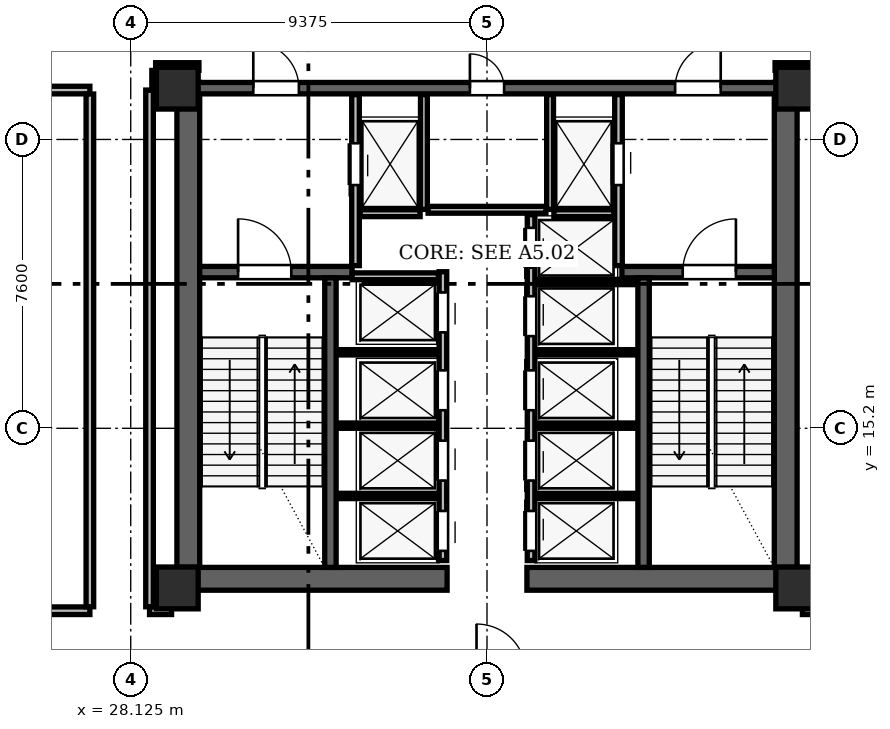
"""IFC4 building model, lengths in metres.
Left out: names, types, materials, properties, quantities, classifications, styles, units other than length and angle.
Written with IfcOpenShell. Run it as: python <this file> out.ifc"""

import sys

from ifc_helpers import new_model, si_unit, direction, frame, frame_2d, origin, origin_2d, place, context, subcontext, project, spatial, rectangle, hollow_rectangle, extrude, element, fill, save


model = new_model("IFC4")
c1 = context("Model", 3, precision=1e-05, world=origin(), true_north=direction((0.0, 1.0)))
c2 = subcontext(c1, "Body", "Model", "MODEL_VIEW")
j1 = project(units=[si_unit("LENGTHUNIT", "METRE"), si_unit("PLANEANGLEUNIT", "RADIAN")], contexts=[c1])
p1 = place(None, origin())
s1 = spatial("IfcSite", under=j1, at=p1, CompositionType="ELEMENT")
p2 = place(p1, origin())
s2 = spatial("IfcBuilding", under=s1, at=p2, CompositionType="ELEMENT")
p3 = place(p2, origin())
s3 = spatial("IfcBuildingStorey", under=s2, at=p3, CompositionType="ELEMENT", Elevation=0.0)
for number, where, z_axis, x_axis in (
    (1, (29.35, 11.0, 0.0), (0.0, 0.0, 1.0), (1.0, 0.0, 0.0)),
    (2, (45.65, 11.0, 0.0), (0.0, 0.0, 1.0), (1.0, 0.0, 0.0)),
    (3, (45.65, 24.15, 0.0), (0.0, 0.0, 1.0), (1.0, 0.0, 0.0)),
    (4, (29.35, 24.15, 0.0), (0.0, 0.0, 1.0), (1.0, 0.0, 0.0)),
):
    element("IfcColumn", number, at=place(p3, frame(where, z_axis=z_axis, x_axis=x_axis)), inside=s3, PredefinedType="COLUMN", context=c2, shape_type="SweptSolid", body=[
        extrude(hollow_rectangle(XDim=1.1, YDim=1.1, WallThickness=0.09, at=origin_2d()), origin(), (0.0, 0.0, 1.0), 5.4),
    ])
for number, where, z_axis, x_axis in (
    (5, (29.64, 11.0, 0.0), (0.0, 0.0, 1.0), (0.0, 1.0, 0.0)),
    (6, (45.36, 11.0, 0.0), (0.0, 0.0, 1.0), (0.0, 1.0, 0.0)),
):
    element("IfcWall", number, at=place(p3, frame(where, z_axis=z_axis, x_axis=x_axis)), inside=s3, PredefinedType="SHEAR", context=c2, shape_type="SweptSolid", body=[
        extrude(rectangle(XDim=13.3, YDim=0.6, at=frame_2d((6.65, 0.0))), origin(), (0.0, 0.0, 1.0), 5.12),
    ])
for number, where, z_axis, x_axis in (
    (7, (29.35, 11.24, 0.0), (0.0, 0.0, 1.0), (1.0, 0.0, 0.0)),
    (8, (38.55, 11.24, 0.0), (0.0, 0.0, 1.0), (1.0, 0.0, 0.0)),
):
    element("IfcWall", number, at=place(p3, frame(where, z_axis=z_axis, x_axis=x_axis)), inside=s3, PredefinedType="SHEAR", context=c2, shape_type="SweptSolid", body=[
        extrude(rectangle(XDim=7.1, YDim=0.6, at=frame_2d((3.55, 0.0))), origin(), (0.0, 0.0, 1.0), 5.12),
    ])
p4 = place(p3, frame((29.65, 24.15, 0.0), z_axis=(0.0, 0.0, 1.0), x_axis=(1.0, 0.0, 0.0)))
e9 = element("IfcWall", 9, at=p4, inside=s3, PredefinedType="SHEAR", context=c2, shape_type="SweptSolid", body=[
    extrude(rectangle(XDim=15.7, YDim=0.3, at=frame_2d((7.85, 0.0))), origin(), (0.0, 0.0, 1.0), 5.12),
])
p5 = place(p4, frame((1.7, 0.0, 0.0)))
e10 = element("IfcOpeningElement", 10, at=p5, cuts=e9, PredefinedType="OPENING", context=c2, shape_type="SweptSolid", body=[
    extrude(rectangle(XDim=1.2, YDim=2.2, at=frame_2d((0.6, 1.1))), frame((0.0, 0.15, 0.0), z_axis=(0.0, -1.0, 0.0), x_axis=(1.0, 0.0, 0.0)), (0.0, 0.0, 1.0), 0.3),
])
p6 = place(p4, frame((12.8, 0.0, 0.0)))
e11 = element("IfcOpeningElement", 11, at=p6, cuts=e9, PredefinedType="OPENING", context=c2, shape_type="SweptSolid", body=[
    extrude(rectangle(XDim=1.2, YDim=2.2, at=frame_2d((0.6, 1.1))), frame((0.0, 0.15, 0.0), z_axis=(0.0, -1.0, 0.0), x_axis=(1.0, 0.0, 0.0)), (0.0, 0.0, 1.0), 0.3),
])
p7 = place(p4, frame((7.4, 0.0, 0.0)))
e12 = element("IfcOpeningElement", 12, at=p7, cuts=e9, PredefinedType="OPENING", context=c2, shape_type="SweptSolid", body=[
    extrude(rectangle(XDim=0.9, YDim=2.05, at=frame_2d((0.45, 1.025))), frame((0.0, 0.15, 0.0), z_axis=(0.0, -1.0, 0.0), x_axis=(1.0, 0.0, 0.0)), (0.0, 0.0, 1.0), 0.3),
])
p8 = place(p3, frame((29.94, 19.31, 0.0), z_axis=(0.0, 0.0, 1.0), x_axis=(1.0, 0.0, 0.0)))
e13 = element("IfcWall", 13, at=p8, inside=s3, PredefinedType="SHEAR", context=c2, shape_type="SweptSolid", body=[
    extrude(rectangle(XDim=4.01, YDim=0.3, at=frame_2d((2.005, 0.0))), origin(), (0.0, 0.0, 1.0), 5.12),
])
p9 = place(p8, frame((1.01, 0.0, 0.0)))
e14 = element("IfcOpeningElement", 14, at=p9, cuts=e13, PredefinedType="OPENING", context=c2, shape_type="SweptSolid", body=[
    extrude(rectangle(XDim=1.4, YDim=2.2, at=frame_2d((0.7, 1.1))), frame((0.0, 0.15, 0.0), z_axis=(0.0, -1.0, 0.0), x_axis=(1.0, 0.0, 0.0)), (0.0, 0.0, 1.0), 0.3),
])
p10 = place(p3, frame((41.05, 19.31, 0.0), z_axis=(0.0, 0.0, 1.0), x_axis=(1.0, 0.0, 0.0)))
e15 = element("IfcWall", 15, at=p10, inside=s3, PredefinedType="SHEAR", context=c2, shape_type="SweptSolid", body=[
    extrude(rectangle(XDim=4.01, YDim=0.3, at=frame_2d((2.005, 0.0))), origin(), (0.0, 0.0, 1.0), 5.12),
])
p11 = place(p10, frame((1.6, 0.0, 0.0)))
e16 = element("IfcOpeningElement", 16, at=p11, cuts=e15, PredefinedType="OPENING", context=c2, shape_type="SweptSolid", body=[
    extrude(rectangle(XDim=1.4, YDim=2.2, at=frame_2d((0.7, 1.1))), frame((0.0, 0.15, 0.0), z_axis=(0.0, -1.0, 0.0), x_axis=(1.0, 0.0, 0.0)), (0.0, 0.0, 1.0), 0.3),
])
for number, where, z_axis, x_axis in (
    (17, (33.38, 11.54, 0.0), (0.0, 0.0, 1.0), (0.0, 1.0, 0.0)),
    (18, (41.62, 11.54, 0.0), (0.0, 0.0, 1.0), (0.0, 1.0, 0.0)),
):
    element("IfcWall", number, at=place(p3, frame(where, z_axis=z_axis, x_axis=x_axis)), inside=s3, PredefinedType="SHEAR", context=c2, shape_type="SweptSolid", body=[
        extrude(rectangle(XDim=7.62, YDim=0.3, at=frame_2d((3.81, 0.0))), origin(), (0.0, 0.0, 1.0), 5.12),
    ])
p12 = place(p3, frame((34.04, 19.48, 0.0), z_axis=(0.0, 0.0, 1.0), x_axis=(0.0, 1.0, 0.0)))
e19 = element("IfcWall", 19, at=p12, inside=s3, PredefinedType="PARTITIONING", context=c2, shape_type="SweptSolid", body=[
    extrude(rectangle(XDim=4.5, YDim=0.2, at=frame_2d((2.25, 0.0))), origin(), (0.0, 0.0, 1.0), 4.16),
])
p13 = place(p12, frame((2.12, 0.0, 0.0)))
e20 = element("IfcOpeningElement", 20, at=p13, cuts=e19, PredefinedType="OPENING", context=c2, shape_type="SweptSolid", body=[
    extrude(rectangle(XDim=1.1, YDim=2.2, at=frame_2d((0.55, 1.1))), frame((0.0, 0.1, 0.0), z_axis=(0.0, -1.0, 0.0), x_axis=(1.0, 0.0, 0.0)), (0.0, 0.0, 1.0), 0.2),
])
p14 = place(p3, frame((35.84, 20.96, 0.0), z_axis=(0.0, 0.0, 1.0), x_axis=(0.0, 1.0, 0.0)))
e21 = element("IfcWall", 21, at=p14, inside=s3, PredefinedType="PARTITIONING", context=c2, shape_type="SweptSolid", body=[
    extrude(rectangle(XDim=3.02, YDim=0.18, at=frame_2d((1.51, 0.0))), origin(), (0.0, 0.0, 1.0), 4.16),
])
p15 = place(p3, frame((34.16, 20.86, 0.0), z_axis=(0.0, 0.0, 1.0), x_axis=(1.0, 0.0, 0.0)))
e22 = element("IfcWall", 22, at=p15, inside=s3, PredefinedType="PARTITIONING", context=c2, shape_type="SweptSolid", body=[
    extrude(rectangle(XDim=1.58, YDim=0.18, at=frame_2d((0.79, 0.0))), origin(), (0.0, 0.0, 1.0), 5.12),
])
p16 = place(p3, frame((40.96, 19.48, 0.0), z_axis=(0.0, 0.0, 1.0), x_axis=(0.0, 1.0, 0.0)))
e23 = element("IfcWall", 23, at=p16, inside=s3, PredefinedType="PARTITIONING", context=c2, shape_type="SweptSolid", body=[
    extrude(rectangle(XDim=4.5, YDim=0.2, at=frame_2d((2.25, 0.0))), origin(), (0.0, 0.0, 1.0), 4.16),
])
p17 = place(p16, frame((2.12, 0.0, 0.0)))
e24 = element("IfcOpeningElement", 24, at=p17, cuts=e23, PredefinedType="OPENING", context=c2, shape_type="SweptSolid", body=[
    extrude(rectangle(XDim=1.1, YDim=2.2, at=frame_2d((0.55, 1.1))), frame((0.0, 0.1, 0.0), z_axis=(0.0, -1.0, 0.0), x_axis=(1.0, 0.0, 0.0)), (0.0, 0.0, 1.0), 0.2),
])
p18 = place(p3, frame((39.16, 20.96, 0.0), z_axis=(0.0, 0.0, 1.0), x_axis=(0.0, 1.0, 0.0)))
e25 = element("IfcWall", 25, at=p18, inside=s3, PredefinedType="PARTITIONING", context=c2, shape_type="SweptSolid", body=[
    extrude(rectangle(XDim=3.02, YDim=0.18, at=frame_2d((1.51, 0.0))), origin(), (0.0, 0.0, 1.0), 4.16),
])
p19 = place(p3, frame((39.26, 20.86, 0.0), z_axis=(0.0, 0.0, 1.0), x_axis=(1.0, 0.0, 0.0)))
e26 = element("IfcWall", 26, at=p19, inside=s3, PredefinedType="PARTITIONING", context=c2, shape_type="SweptSolid", body=[
    extrude(rectangle(XDim=1.58, YDim=0.18, at=frame_2d((0.79, 0.0))), origin(), (0.0, 0.0, 1.0), 5.12),
])
p20 = place(p3, frame((36.34, 11.72, 0.0), z_axis=(0.0, 0.0, 1.0), x_axis=(0.0, 1.0, 0.0)))
e27 = element("IfcWall", 27, at=p20, inside=s3, PredefinedType="PARTITIONING", context=c2, shape_type="SweptSolid", body=[
    extrude(rectangle(XDim=7.6, YDim=0.2, at=frame_2d((3.8, 0.0))), origin(), (0.0, 0.0, 1.0), 5.12),
])
p21 = place(p20, frame((0.255, 0.0, 0.0)))
e28 = element("IfcOpeningElement", 28, at=p21, cuts=e27, PredefinedType="OPENING", context=c2, shape_type="SweptSolid", body=[
    extrude(rectangle(XDim=1.05, YDim=2.15, at=frame_2d((0.525, 1.075))), frame((0.0, 0.1, 0.0), z_axis=(0.0, -1.0, 0.0), x_axis=(1.0, 0.0, 0.0)), (0.0, 0.0, 1.0), 0.2),
])
p22 = place(p20, frame((2.105, 0.0, 0.0)))
e29 = element("IfcOpeningElement", 29, at=p22, cuts=e27, PredefinedType="OPENING", context=c2, shape_type="SweptSolid", body=[
    extrude(rectangle(XDim=1.05, YDim=2.15, at=frame_2d((0.525, 1.075))), frame((0.0, 0.1, 0.0), z_axis=(0.0, -1.0, 0.0), x_axis=(1.0, 0.0, 0.0)), (0.0, 0.0, 1.0), 0.2),
])
p23 = place(p20, frame((3.955, 0.0, 0.0)))
e30 = element("IfcOpeningElement", 30, at=p23, cuts=e27, PredefinedType="OPENING", context=c2, shape_type="SweptSolid", body=[
    extrude(rectangle(XDim=1.05, YDim=2.15, at=frame_2d((0.525, 1.075))), frame((0.0, 0.1, 0.0), z_axis=(0.0, -1.0, 0.0), x_axis=(1.0, 0.0, 0.0)), (0.0, 0.0, 1.0), 0.2),
])
p24 = place(p20, frame((6.005, 0.0, 0.0)))
e31 = element("IfcOpeningElement", 31, at=p24, cuts=e27, PredefinedType="OPENING", context=c2, shape_type="SweptSolid", body=[
    extrude(rectangle(XDim=1.05, YDim=2.15, at=frame_2d((0.525, 1.075))), frame((0.0, 0.1, 0.0), z_axis=(0.0, -1.0, 0.0), x_axis=(1.0, 0.0, 0.0)), (0.0, 0.0, 1.0), 0.2),
])
p25 = place(p3, frame((33.95, 19.2, 0.0), z_axis=(0.0, 0.0, 1.0), x_axis=(1.0, 0.0, 0.0)))
e32 = element("IfcWall", 32, at=p25, inside=s3, PredefinedType="PARTITIONING", context=c2, shape_type="SweptSolid", body=[
    extrude(rectangle(XDim=2.27, YDim=0.18, at=frame_2d((1.135, 0.0))), origin(), (0.0, 0.0, 1.0), 5.12),
])
for number, where, z_axis, x_axis in (
    (33, (33.56, 13.42, 0.0), (0.0, 0.0, 1.0), (1.0, 0.0, 0.0)),
    (34, (33.56, 15.27, 0.0), (0.0, 0.0, 1.0), (1.0, 0.0, 0.0)),
    (35, (33.56, 17.2, 0.0), (0.0, 0.0, 1.0), (1.0, 0.0, 0.0)),
):
    element("IfcWall", number, at=place(p3, frame(where, z_axis=z_axis, x_axis=x_axis)), inside=s3, PredefinedType="PARTITIONING", context=c2, shape_type="SweptSolid", body=[
        extrude(rectangle(XDim=2.66, YDim=0.14, at=frame_2d((1.33, 0.0))), origin(), (0.0, 0.0, 1.0), 5.12),
    ])
p26 = place(p3, frame((38.66, 11.72, 0.0), z_axis=(0.0, 0.0, 1.0), x_axis=(0.0, 1.0, 0.0)))
e36 = element("IfcWall", 36, at=p26, inside=s3, PredefinedType="PARTITIONING", context=c2, shape_type="SweptSolid", body=[
    extrude(rectangle(XDim=9.1, YDim=0.2, at=frame_2d((4.55, 0.0))), origin(), (0.0, 0.0, 1.0), 5.12),
])
p27 = place(p26, frame((0.255, 0.0, 0.0)))
e37 = element("IfcOpeningElement", 37, at=p27, cuts=e36, PredefinedType="OPENING", context=c2, shape_type="SweptSolid", body=[
    extrude(rectangle(XDim=1.05, YDim=2.15, at=frame_2d((0.525, 1.075))), frame((0.0, 0.1, 0.0), z_axis=(0.0, -1.0, 0.0), x_axis=(1.0, 0.0, 0.0)), (0.0, 0.0, 1.0), 0.2),
])
p28 = place(p26, frame((2.105, 0.0, 0.0)))
e38 = element("IfcOpeningElement", 38, at=p28, cuts=e36, PredefinedType="OPENING", context=c2, shape_type="SweptSolid", body=[
    extrude(rectangle(XDim=1.05, YDim=2.15, at=frame_2d((0.525, 1.075))), frame((0.0, 0.1, 0.0), z_axis=(0.0, -1.0, 0.0), x_axis=(1.0, 0.0, 0.0)), (0.0, 0.0, 1.0), 0.2),
])
p29 = place(p26, frame((3.955, 0.0, 0.0)))
e39 = element("IfcOpeningElement", 39, at=p29, cuts=e36, PredefinedType="OPENING", context=c2, shape_type="SweptSolid", body=[
    extrude(rectangle(XDim=1.05, YDim=2.15, at=frame_2d((0.525, 1.075))), frame((0.0, 0.1, 0.0), z_axis=(0.0, -1.0, 0.0), x_axis=(1.0, 0.0, 0.0)), (0.0, 0.0, 1.0), 0.2),
])
p30 = place(p26, frame((5.905, 0.0, 0.0)))
e40 = element("IfcOpeningElement", 40, at=p30, cuts=e36, PredefinedType="OPENING", context=c2, shape_type="SweptSolid", body=[
    extrude(rectangle(XDim=1.05, YDim=2.15, at=frame_2d((0.525, 1.075))), frame((0.0, 0.1, 0.0), z_axis=(0.0, -1.0, 0.0), x_axis=(1.0, 0.0, 0.0)), (0.0, 0.0, 1.0), 0.2),
])
p31 = place(p26, frame((7.705, 0.0, 0.0)))
e41 = element("IfcOpeningElement", 41, at=p31, cuts=e36, PredefinedType="OPENING", context=c2, shape_type="SweptSolid", body=[
    extrude(rectangle(XDim=1.05, YDim=2.15, at=frame_2d((0.525, 1.075))), frame((0.0, 0.1, 0.0), z_axis=(0.0, -1.0, 0.0), x_axis=(1.0, 0.0, 0.0)), (0.0, 0.0, 1.0), 0.2),
])
for number, where, z_axis, x_axis in (
    (42, (38.78, 13.42, 0.0), (0.0, 0.0, 1.0), (1.0, 0.0, 0.0)),
    (43, (38.78, 15.27, 0.0), (0.0, 0.0, 1.0), (1.0, 0.0, 0.0)),
    (44, (38.78, 17.2, 0.0), (0.0, 0.0, 1.0), (1.0, 0.0, 0.0)),
    (45, (38.78, 19.05, 0.0), (0.0, 0.0, 1.0), (1.0, 0.0, 0.0)),
):
    element("IfcWall", number, at=place(p3, frame(where, z_axis=z_axis, x_axis=x_axis)), inside=s3, PredefinedType="PARTITIONING", context=c2, shape_type="SweptSolid", body=[
        extrude(rectangle(XDim=2.66, YDim=0.14, at=frame_2d((1.33, 0.0))), origin(), (0.0, 0.0, 1.0), 5.12),
    ])
p32 = place(p3, frame((35.95, 20.95, 0.0), z_axis=(0.0, 0.0, 1.0), x_axis=(1.0, 0.0, 0.0)))
e46 = element("IfcWall", 46, at=p32, inside=s3, PredefinedType="PARTITIONING", context=c2, shape_type="SweptSolid", body=[
    extrude(rectangle(XDim=3.1, YDim=0.18, at=frame_2d((1.55, 0.0))), origin(), (0.0, 0.0, 1.0), 5.12),
])
p33 = place(p3, frame((16.25, 10.4, 0.0), z_axis=(0.0, 0.0, 1.0), x_axis=(1.0, 0.0, 0.0)))
e47 = element("IfcWall", 47, at=p33, inside=s3, PredefinedType="PARTITIONING", context=c2, shape_type="SweptSolid", body=[
    extrude(rectangle(XDim=10.8, YDim=0.2, at=frame_2d((5.4, 0.0))), origin(), (0.0, 0.0, 1.0), 5.12),
])
for number, where, z_axis, x_axis in (
    (48, (28.62, 10.4, 0.0), (0.0, 0.0, 1.0), (1.0, 0.0, 0.0)),
    (49, (45.8, 10.4, 0.0), (0.0, 0.0, 1.0), (1.0, 0.0, 0.0)),
):
    element("IfcWall", number, at=place(p3, frame(where, z_axis=z_axis, x_axis=x_axis)), inside=s3, PredefinedType="PARTITIONING", context=c2, shape_type="SweptSolid", body=[
        extrude(rectangle(XDim=0.58, YDim=0.2, at=frame_2d((0.29, 0.0))), origin(), (0.0, 0.0, 1.0), 4.183),
    ])
p34 = place(p3, frame((22.6, 24.1, 0.0), z_axis=(0.0, 0.0, 1.0), x_axis=(1.0, 0.0, 0.0)))
e50 = element("IfcWall", 50, at=p34, inside=s3, PredefinedType="PARTITIONING", context=c2, shape_type="SweptSolid", body=[
    extrude(rectangle(XDim=4.45, YDim=0.2, at=frame_2d((2.225, 0.0))), origin(), (0.0, 0.0, 1.0), 5.12),
])
for number, where, z_axis, x_axis in (
    (51, (28.78, 24.72, 0.0), (0.0, 0.0, 1.0), (1.0, 0.0, 0.0)),
    (52, (45.08, 24.72, 0.0), (0.0, 0.0, 1.0), (1.0, 0.0, 0.0)),
):
    element("IfcWall", number, at=place(p3, frame(where, z_axis=z_axis, x_axis=x_axis)), inside=s3, PredefinedType="PARTITIONING", context=c2, shape_type="SweptSolid", body=[
        extrude(rectangle(XDim=1.14, YDim=0.2, at=frame_2d((0.57, 0.0))), origin(), (0.0, 0.0, 1.0), 4.183),
    ])
p35 = place(p3, frame((27.05, 10.504, 0.0), z_axis=(0.0, 0.0, 1.0), x_axis=(0.0, 1.0, 0.0)))
e53 = element("IfcWall", 53, at=p35, inside=s3, PredefinedType="PARTITIONING", context=c2, shape_type="SweptSolid", body=[
    extrude(rectangle(XDim=13.492, YDim=0.2, at=frame_2d((6.746, 0.0))), origin(), (0.0, 0.0, 1.0), 4.183),
])
p36 = place(p3, frame((28.62, 10.504, 0.0), z_axis=(0.0, 0.0, 1.0), x_axis=(0.0, 1.0, 0.0)))
e54 = element("IfcWall", 54, at=p36, inside=s3, PredefinedType="PARTITIONING", context=c2, shape_type="SweptSolid", body=[
    extrude(rectangle(XDim=13.596, YDim=0.2, at=frame_2d((6.798, 0.0))), origin(), (0.0, 0.0, 1.0), 4.183),
])
p37 = place(p3, frame((28.78, 24.1, 0.0), z_axis=(0.0, 0.0, 1.0), x_axis=(0.0, 1.0, 0.0)))
e55 = element("IfcWall", 55, at=p37, inside=s3, PredefinedType="PARTITIONING", context=c2, shape_type="SweptSolid", body=[
    extrude(rectangle(XDim=0.516, YDim=0.2, at=frame_2d((0.258, 0.0))), origin(), (0.0, 0.0, 1.0), 5.12),
])
p38 = place(p13, origin())
e56 = element("IfcDoor", 56, at=p38, inside=s3, OperationType="SLIDING_TO_LEFT", PredefinedType="DOOR", context=c2, shape_type="SweptSolid", body=[
    extrude(rectangle(XDim=1.1, YDim=2.2, at=frame_2d((0.55, 1.1))), frame((0.0, 0.025, 0.0), z_axis=(0.0, -1.0, 0.0), x_axis=(1.0, 0.0, 0.0)), (0.0, 0.0, 1.0), 0.05),
])
fill(e20, e56)
p39 = place(p17, origin())
e57 = element("IfcDoor", 57, at=p39, inside=s3, OperationType="SLIDING_TO_RIGHT", PredefinedType="DOOR", context=c2, shape_type="SweptSolid", body=[
    extrude(rectangle(XDim=1.1, YDim=2.2, at=frame_2d((0.55, 1.1))), frame((0.0, 0.025, 0.0), z_axis=(0.0, -1.0, 0.0), x_axis=(1.0, 0.0, 0.0)), (0.0, 0.0, 1.0), 0.05),
])
fill(e24, e57)
p40 = place(p21, origin())
e58 = element("IfcDoor", 58, at=p40, inside=s3, OperationType="SLIDING_TO_LEFT", PredefinedType="DOOR", context=c2, shape_type="SweptSolid", body=[
    extrude(rectangle(XDim=1.05, YDim=2.15, at=frame_2d((0.525, 1.075))), frame((0.0, 0.025, 0.0), z_axis=(0.0, -1.0, 0.0), x_axis=(1.0, 0.0, 0.0)), (0.0, 0.0, 1.0), 0.05),
])
fill(e28, e58)
p41 = place(p22, origin())
e59 = element("IfcDoor", 59, at=p41, inside=s3, OperationType="SLIDING_TO_RIGHT", PredefinedType="DOOR", context=c2, shape_type="SweptSolid", body=[
    extrude(rectangle(XDim=1.05, YDim=2.15, at=frame_2d((0.525, 1.075))), frame((0.0, 0.025, 0.0), z_axis=(0.0, -1.0, 0.0), x_axis=(1.0, 0.0, 0.0)), (0.0, 0.0, 1.0), 0.05),
])
fill(e29, e59)
p42 = place(p23, origin())
e60 = element("IfcDoor", 60, at=p42, inside=s3, OperationType="SLIDING_TO_LEFT", PredefinedType="DOOR", context=c2, shape_type="SweptSolid", body=[
    extrude(rectangle(XDim=1.05, YDim=2.15, at=frame_2d((0.525, 1.075))), frame((0.0, 0.025, 0.0), z_axis=(0.0, -1.0, 0.0), x_axis=(1.0, 0.0, 0.0)), (0.0, 0.0, 1.0), 0.05),
])
fill(e30, e60)
p43 = place(p27, origin())
e61 = element("IfcDoor", 61, at=p43, inside=s3, OperationType="SLIDING_TO_RIGHT", PredefinedType="DOOR", context=c2, shape_type="SweptSolid", body=[
    extrude(rectangle(XDim=1.05, YDim=2.15, at=frame_2d((0.525, 1.075))), frame((0.0, 0.025, 0.0), z_axis=(0.0, -1.0, 0.0), x_axis=(1.0, 0.0, 0.0)), (0.0, 0.0, 1.0), 0.05),
])
fill(e37, e61)
p44 = place(p28, origin())
e62 = element("IfcDoor", 62, at=p44, inside=s3, OperationType="SLIDING_TO_LEFT", PredefinedType="DOOR", context=c2, shape_type="SweptSolid", body=[
    extrude(rectangle(XDim=1.05, YDim=2.15, at=frame_2d((0.525, 1.075))), frame((0.0, 0.025, 0.0), z_axis=(0.0, -1.0, 0.0), x_axis=(1.0, 0.0, 0.0)), (0.0, 0.0, 1.0), 0.05),
])
fill(e38, e62)
p45 = place(p29, origin())
e63 = element("IfcDoor", 63, at=p45, inside=s3, OperationType="SLIDING_TO_RIGHT", PredefinedType="DOOR", context=c2, shape_type="SweptSolid", body=[
    extrude(rectangle(XDim=1.05, YDim=2.15, at=frame_2d((0.525, 1.075))), frame((0.0, 0.025, 0.0), z_axis=(0.0, -1.0, 0.0), x_axis=(1.0, 0.0, 0.0)), (0.0, 0.0, 1.0), 0.05),
])
fill(e39, e63)
p46 = place(p24, origin())
e64 = element("IfcDoor", 64, at=p46, inside=s3, OperationType="SLIDING_TO_LEFT", PredefinedType="DOOR", context=c2, shape_type="SweptSolid", body=[
    extrude(rectangle(XDim=1.05, YDim=2.15, at=frame_2d((0.525, 1.075))), frame((0.0, 0.025, 0.0), z_axis=(0.0, -1.0, 0.0), x_axis=(1.0, 0.0, 0.0)), (0.0, 0.0, 1.0), 0.05),
])
fill(e31, e64)
p47 = place(p30, origin())
e65 = element("IfcDoor", 65, at=p47, inside=s3, OperationType="SLIDING_TO_RIGHT", PredefinedType="DOOR", context=c2, shape_type="SweptSolid", body=[
    extrude(rectangle(XDim=1.05, YDim=2.15, at=frame_2d((0.525, 1.075))), frame((0.0, 0.025, 0.0), z_axis=(0.0, -1.0, 0.0), x_axis=(1.0, 0.0, 0.0)), (0.0, 0.0, 1.0), 0.05),
])
fill(e40, e65)
p48 = place(p31, origin())
e66 = element("IfcDoor", 66, at=p48, inside=s3, OperationType="SLIDING_TO_LEFT", PredefinedType="DOOR", context=c2, shape_type="SweptSolid", body=[
    extrude(rectangle(XDim=1.05, YDim=2.15, at=frame_2d((0.525, 1.075))), frame((0.0, 0.025, 0.0), z_axis=(0.0, -1.0, 0.0), x_axis=(1.0, 0.0, 0.0)), (0.0, 0.0, 1.0), 0.05),
])
fill(e41, e66)
p49 = place(p9, origin())
e67 = element("IfcDoor", 67, at=p49, inside=s3, OperationType="SINGLE_SWING_LEFT", PredefinedType="DOOR", context=c2, shape_type="SweptSolid", body=[
    extrude(rectangle(XDim=1.4, YDim=2.2, at=frame_2d((0.7, 1.1))), frame((0.0, 0.025, 0.0), z_axis=(0.0, -1.0, 0.0), x_axis=(1.0, 0.0, 0.0)), (0.0, 0.0, 1.0), 0.05),
])
fill(e14, e67)
p50 = place(p11, origin())
e68 = element("IfcDoor", 68, at=p50, inside=s3, OperationType="SINGLE_SWING_RIGHT", PredefinedType="DOOR", context=c2, shape_type="SweptSolid", body=[
    extrude(rectangle(XDim=1.4, YDim=2.2, at=frame_2d((0.7, 1.1))), frame((0.0, 0.025, 0.0), z_axis=(0.0, -1.0, 0.0), x_axis=(1.0, 0.0, 0.0)), (0.0, 0.0, 1.0), 0.05),
])
fill(e16, e68)
p51 = place(p5, origin())
e69 = element("IfcDoor", 69, at=p51, inside=s3, OperationType="SINGLE_SWING_LEFT", PredefinedType="DOOR", context=c2, shape_type="SweptSolid", body=[
    extrude(rectangle(XDim=1.2, YDim=2.2, at=frame_2d((0.6, 1.1))), frame((0.0, 0.025, 0.0), z_axis=(0.0, -1.0, 0.0), x_axis=(1.0, 0.0, 0.0)), (0.0, 0.0, 1.0), 0.05),
])
fill(e10, e69)
p52 = place(p6, origin())
e70 = element("IfcDoor", 70, at=p52, inside=s3, OperationType="SINGLE_SWING_RIGHT", PredefinedType="DOOR", context=c2, shape_type="SweptSolid", body=[
    extrude(rectangle(XDim=1.2, YDim=2.2, at=frame_2d((0.6, 1.1))), frame((0.0, 0.025, 0.0), z_axis=(0.0, -1.0, 0.0), x_axis=(1.0, 0.0, 0.0)), (0.0, 0.0, 1.0), 0.05),
])
fill(e11, e70)
p53 = place(p7, origin())
e71 = element("IfcDoor", 71, at=p53, inside=s3, OperationType="SINGLE_SWING_LEFT", PredefinedType="DOOR", context=c2, shape_type="SweptSolid", body=[
    extrude(rectangle(XDim=0.9, YDim=2.05, at=frame_2d((0.45, 1.025))), frame((0.0, 0.025, 0.0), z_axis=(0.0, -1.0, 0.0), x_axis=(1.0, 0.0, 0.0)), (0.0, 0.0, 1.0), 0.05),
])
fill(e12, e71)
save(model, sys.argv[1])
